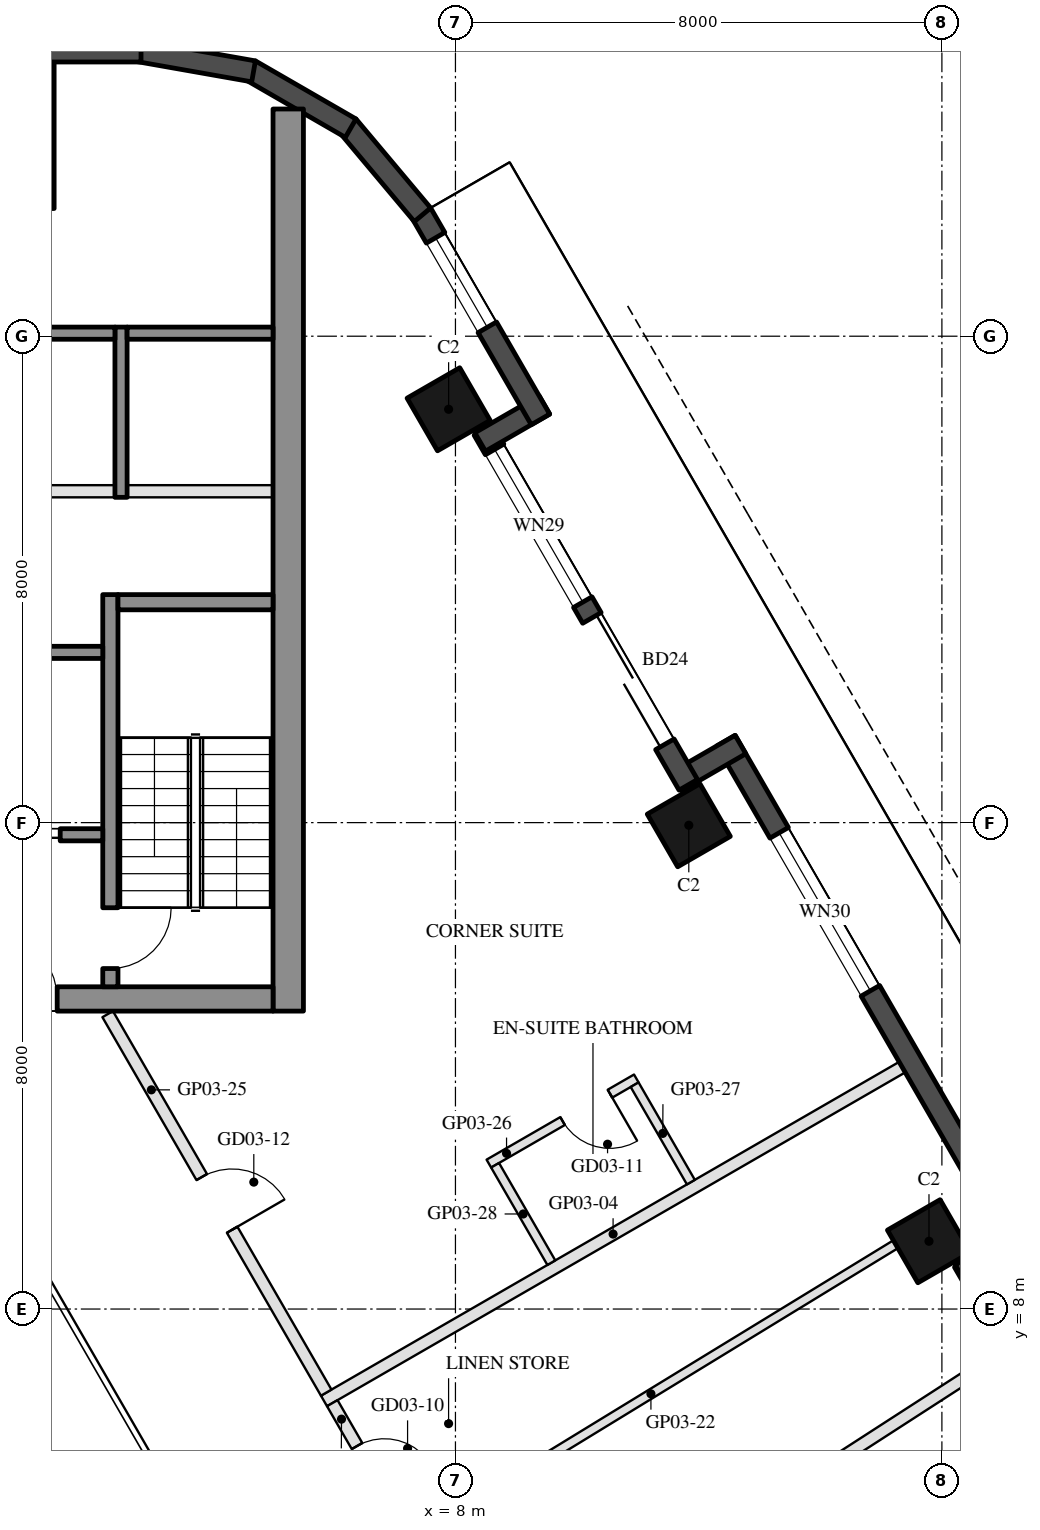
"""IFC4 building model, lengths in metres.
Left out: names, types, materials, properties, quantities, classifications, styles, units other than length and angle.
Written with IfcOpenShell. Run it as: python <this file> out.ifc"""

import sys

from ifc_helpers import new_model, si_unit, direction, frame, frame_2d, origin, origin_2d, place, context, subcontext, project, spatial, rectangle, hollow_rectangle, extrude, element, fill, save


model = new_model("IFC4")
c1 = context("Model", 3, precision=1e-05, world=origin(), true_north=direction((0.0, 1.0)))
c2 = subcontext(c1, "Body", "Model", "MODEL_VIEW")
j1 = project(units=[si_unit("LENGTHUNIT", "METRE"), si_unit("PLANEANGLEUNIT", "RADIAN")], contexts=[c1])
p1 = place(None, origin())
s1 = spatial("IfcSite", under=j1, at=p1, CompositionType="ELEMENT")
p2 = place(p1, origin())
s2 = spatial("IfcBuilding", under=s1, at=p2, CompositionType="ELEMENT")
p3 = place(p2, frame((0.0, 0.0, 61.3)))
s3 = spatial("IfcBuildingStorey", under=s2, at=p3, CompositionType="ELEMENT", Elevation=61.3)
for number, where, z_axis, x_axis in (
    (1, (15.788, 9.115, 0.0), (0.0, 0.0, 1.0), (-0.5, 0.866, 0.0)),
    (2, (11.838, 15.957, 0.0), (0.0, 0.0, 1.0), (-0.5, 0.866, 0.0)),
    (3, (7.888, 22.798, 0.0), (0.0, 0.0, 1.0), (-0.5, 0.866, 0.0)),
):
    element("IfcColumn", number, at=place(p3, frame(where, z_axis=z_axis, x_axis=x_axis)), inside=s3, PredefinedType="COLUMN", context=c2, shape_type="SweptSolid", body=[
        extrude(hollow_rectangle(XDim=1.0, YDim=1.0, WallThickness=0.045, at=origin_2d()), origin(), (0.0, 0.0, 1.0), 3.7),
    ])
p4 = place(p3, frame((0.0, 27.3, 0.0), z_axis=(0.0, 0.0, 1.0), x_axis=(1.0, 0.0, 0.0)))
e4 = element("IfcColumn", 4, at=p4, inside=s3, PredefinedType="COLUMN", context=c2, shape_type="SweptSolid", body=[
    extrude(hollow_rectangle(XDim=2.8, YDim=2.4, WallThickness=0.07, at=origin_2d()), origin(), (0.0, 0.0, 1.0), 3.7),
])
p5 = place(p3, frame((19.729, 2.938, 0.0), z_axis=(0.0, 0.0, 1.0), x_axis=(-0.499976430342, 0.866039011305, 0.0)))
e5 = element("IfcWall", 5, at=p5, inside=s3, PredefinedType="SOLIDWALL", context=c2, shape_type="SweptSolid", body=[
    extrude(rectangle(XDim=6.74, YDim=0.35, at=frame_2d((3.37, 0.0))), origin(), (0.0, 0.0, 1.0), 3.55),
])
p6 = place(p5, frame((0.77, 0.0, 0.3)))
e6 = element("IfcOpeningElement", 6, at=p6, cuts=e5, PredefinedType="OPENING", context=c2, shape_type="SweptSolid", body=[
    extrude(rectangle(XDim=1.7, YDim=2.65, at=frame_2d((0.85, 1.325))), frame((0.0, 0.185, 0.0), z_axis=(0.0, -1.0, 0.0), x_axis=(1.0, 0.0, 0.0)), (0.0, 0.0, 1.0), 0.37),
])
p7 = place(p5, frame((2.77, 0.0, 0.3)))
e7 = element("IfcOpeningElement", 7, at=p7, cuts=e5, PredefinedType="OPENING", context=c2, shape_type="SweptSolid", body=[
    extrude(rectangle(XDim=1.7, YDim=2.65, at=frame_2d((0.85, 1.325))), frame((0.0, 0.185, 0.0), z_axis=(0.0, -1.0, 0.0), x_axis=(1.0, 0.0, 0.0)), (0.0, 0.0, 1.0), 0.37),
])
p8 = place(p3, frame((16.306, 8.577, 0.0), z_axis=(0.0, 0.0, 1.0), x_axis=(0.866092288191, 0.499884134912, 0.0)))
e8 = element("IfcWall", 8, at=p8, inside=s3, PredefinedType="SOLIDWALL", context=c2, shape_type="SweptSolid", body=[
    extrude(rectangle(XDim=1.22, YDim=0.35, at=frame_2d((0.61, 0.0))), origin(), (0.0, 0.0, 1.0), 3.55),
])
p9 = place(p3, frame((17.299, 8.948, 0.0), z_axis=(0.0, 0.0, 1.0), x_axis=(-0.500010041276, 0.866019606374, 0.0)))
e9 = element("IfcWall", 9, at=p9, inside=s3, PredefinedType="SOLIDWALL", context=c2, shape_type="SweptSolid", body=[
    extrude(rectangle(XDim=9.7, YDim=0.35, at=frame_2d((4.85, 0.0))), origin(), (0.0, 0.0, 1.0), 3.55),
])
p10 = place(p9, frame((4.949, 0.0, 0.3)))
e10 = element("IfcOpeningElement", 10, at=p10, cuts=e9, PredefinedType="OPENING", context=c2, shape_type="SweptSolid", body=[
    extrude(rectangle(XDim=3.0, YDim=2.65, at=frame_2d((1.5, 1.325))), frame((0.0, 0.185, 0.0), z_axis=(0.0, -1.0, 0.0), x_axis=(1.0, 0.0, 0.0)), (0.0, 0.0, 1.0), 0.37),
])
p11 = place(p3, frame((12.688, 17.284, 0.0), z_axis=(0.0, 0.0, 1.0), x_axis=(-0.865955602162, -0.500120880472, 0.0)))
e11 = element("IfcWall", 11, at=p11, inside=s3, PredefinedType="SOLIDWALL", context=c2, shape_type="SweptSolid", body=[
    extrude(rectangle(XDim=1.22, YDim=0.35, at=frame_2d((0.61, 0.0))), origin(), (0.0, 0.0, 1.0), 3.55),
])
p12 = place(p3, frame((11.829, 16.621, 0.0), z_axis=(0.0, 0.0, 1.0), x_axis=(-0.500003597184, 0.866023326939, 0.0)))
e12 = element("IfcWall", 12, at=p12, inside=s3, PredefinedType="SOLIDWALL", context=c2, shape_type="SweptSolid", body=[
    extrude(rectangle(XDim=6.74, YDim=0.35, at=frame_2d((3.37, 0.0))), origin(), (0.0, 0.0, 1.0), 3.55),
])
p13 = place(p12, frame((0.77, 0.0, 0.0)))
e13 = element("IfcOpeningElement", 13, at=p13, cuts=e12, PredefinedType="OPENING", context=c2, shape_type="SweptSolid", body=[
    extrude(rectangle(XDim=2.4, YDim=2.4, at=frame_2d((1.2, 1.2))), frame((0.0, 0.185, 0.0), z_axis=(0.0, -1.0, 0.0), x_axis=(1.0, 0.0, 0.0)), (0.0, 0.0, 1.0), 0.37),
])
p14 = place(p12, frame((3.47, 0.0, 0.3)))
e14 = element("IfcOpeningElement", 14, at=p14, cuts=e12, PredefinedType="OPENING", context=c2, shape_type="SweptSolid", body=[
    extrude(rectangle(XDim=2.9, YDim=2.65, at=frame_2d((1.45, 1.325))), frame((0.0, 0.185, 0.0), z_axis=(0.0, -1.0, 0.0), x_axis=(1.0, 0.0, 0.0)), (0.0, 0.0, 1.0), 0.37),
])
p15 = place(p3, frame((8.406, 22.26, 0.0), z_axis=(0.0, 0.0, 1.0), x_axis=(0.865955602162, 0.500120880472, 0.0)))
e15 = element("IfcWall", 15, at=p15, inside=s3, PredefinedType="SOLIDWALL", context=c2, shape_type="SweptSolid", body=[
    extrude(rectangle(XDim=1.22, YDim=0.35, at=frame_2d((0.61, 0.0))), origin(), (0.0, 0.0, 1.0), 3.55),
])
p16 = place(p3, frame((9.398, 22.631, 0.0), z_axis=(0.0, 0.0, 1.0), x_axis=(-0.499954521343, 0.866051659307, 0.0)))
e16 = element("IfcWall", 16, at=p16, inside=s3, PredefinedType="SOLIDWALL", context=c2, shape_type="SweptSolid", body=[
    extrude(rectangle(XDim=3.916, YDim=0.35, at=frame_2d((1.958, 0.0))), origin(), (0.0, 0.0, 1.0), 3.55),
])
p17 = place(p16, frame((1.75, 0.0, 0.3)))
e17 = element("IfcOpeningElement", 17, at=p17, cuts=e16, PredefinedType="OPENING", context=c2, shape_type="SweptSolid", body=[
    extrude(rectangle(XDim=1.7, YDim=2.65, at=frame_2d((0.85, 1.325))), frame((0.0, 0.185, 0.0), z_axis=(0.0, -1.0, 0.0), x_axis=(1.0, 0.0, 0.0)), (0.0, 0.0, 1.0), 0.37),
])
p18 = place(p3, frame((7.458, 25.998, 0.0), z_axis=(0.0, 0.0, 1.0), x_axis=(-0.642808304945, 0.766027077259, 0.0)))
e18 = element("IfcWall", 18, at=p18, inside=s3, PredefinedType="SOLIDWALL", context=c2, shape_type="SweptSolid", body=[
    extrude(rectangle(XDim=1.91, YDim=0.35, at=frame_2d((0.955, 0.0))), origin(), (0.0, 0.0, 1.0), 3.55),
])
for number, where, z_axis, x_axis in (
    (19, (6.277, 27.422, 0.0), (0.0, 0.0, 1.0), (-0.866, 0.5, 0.0)),
    (20, (4.68, 28.356, 0.0), (0.0, 0.0, 1.0), (-0.985, 0.174, 0.0)),
):
    element("IfcWall", number, at=place(p3, frame(where, z_axis=z_axis, x_axis=x_axis)), inside=s3, PredefinedType="SOLIDWALL", context=c2, shape_type="SweptSolid", body=[
        extrude(rectangle(XDim=1.91, YDim=0.35, at=frame_2d((0.955, 0.0))), origin(), (0.0, 0.0, 1.0), 3.55),
    ])
p19 = place(p3, frame((2.829, 28.685, 0.0), z_axis=(0.0, 0.0, 1.0), x_axis=(-1.0, 0.0, 0.0)))
e21 = element("IfcWall", 21, at=p19, inside=s3, PredefinedType="SOLIDWALL", context=c2, shape_type="SweptSolid", body=[
    extrude(rectangle(XDim=5.658, YDim=0.35, at=frame_2d((2.829, 0.0))), origin(), (0.0, 0.0, 1.0), 3.55),
])
p20 = place(p3, frame((5.25, 12.9, 0.0), z_axis=(0.0, 0.0, 1.0), x_axis=(0.0, 1.0, 0.0)))
e22 = element("IfcWall", 22, at=p20, inside=s3, PredefinedType="SHEAR", context=c2, shape_type="SweptSolid", body=[
    extrude(rectangle(XDim=14.837, YDim=0.5, at=frame_2d((7.418, 0.0))), origin(), (0.0, 0.0, 1.0), 3.5),
])
p21 = place(p3, frame((5.0, 13.1, 0.0), z_axis=(0.0, 0.0, 1.0), x_axis=(-1.0, 0.0, 0.0)))
e23 = element("IfcWall", 23, at=p21, inside=s3, PredefinedType="SHEAR", context=c2, shape_type="SweptSolid", body=[
    extrude(rectangle(XDim=10.0, YDim=0.4, at=frame_2d((5.0, 0.0))), origin(), (0.0, 0.0, 1.0), 3.5),
])
p22 = place(p21, frame((3.55, 0.0, 0.0)))
e24 = element("IfcOpeningElement", 24, at=p22, cuts=e23, PredefinedType="OPENING", context=c2, shape_type="SweptSolid", body=[
    extrude(rectangle(XDim=1.1, YDim=2.1, at=frame_2d((0.55, 1.05))), frame((0.0, 0.21, 0.0), z_axis=(0.0, -1.0, 0.0), x_axis=(1.0, 0.0, 0.0)), (0.0, 0.0, 1.0), 0.42),
])
p23 = place(p21, frame((5.85, 0.0, 0.0)))
e25 = element("IfcOpeningElement", 25, at=p23, cuts=e23, PredefinedType="OPENING", context=c2, shape_type="SweptSolid", body=[
    extrude(rectangle(XDim=1.4, YDim=2.1, at=frame_2d((0.7, 1.05))), frame((0.0, 0.21, 0.0), z_axis=(0.0, -1.0, 0.0), x_axis=(1.0, 0.0, 0.0)), (0.0, 0.0, 1.0), 0.42),
])
p24 = place(p3, frame((2.325, 13.3, 0.0), z_axis=(0.0, 0.0, 1.0), x_axis=(0.0, 1.0, 0.0)))
e26 = element("IfcWall", 26, at=p24, inside=s3, PredefinedType="SHEAR", context=c2, shape_type="SweptSolid", body=[
    extrude(rectangle(XDim=6.45, YDim=0.25, at=frame_2d((3.225, 0.0))), origin(), (0.0, 0.0, 1.0), 3.5),
])
p25 = place(p24, frame((0.3, 0.0, 0.0)))
e27 = element("IfcOpeningElement", 27, at=p25, cuts=e26, PredefinedType="OPENING", context=c2, shape_type="SweptSolid", body=[
    extrude(rectangle(XDim=1.0, YDim=2.1, at=frame_2d((0.5, 1.05))), frame((0.0, 0.135, 0.0), z_axis=(0.0, -1.0, 0.0), x_axis=(1.0, 0.0, 0.0)), (0.0, 0.0, 1.0), 0.27),
])
p26 = place(p3, frame((5.0, 19.625, 0.0), z_axis=(0.0, 0.0, 1.0), x_axis=(-1.0, 0.0, 0.0)))
e28 = element("IfcWall", 28, at=p26, inside=s3, PredefinedType="SHEAR", context=c2, shape_type="SweptSolid", body=[
    extrude(rectangle(XDim=2.55, YDim=0.25, at=frame_2d((1.275, 0.0))), origin(), (0.0, 0.0, 1.0), 3.5),
])
p27 = place(p3, frame((2.2, 18.8, 0.0), z_axis=(0.0, 0.0, 1.0), x_axis=(-1.0, 0.0, 0.0)))
e29 = element("IfcWall", 29, at=p27, inside=s3, PredefinedType="SHEAR", context=c2, shape_type="SweptSolid", body=[
    extrude(rectangle(XDim=2.8, YDim=0.2, at=frame_2d((1.4, 0.0))), origin(), (0.0, 0.0, 1.0), 3.5),
])
p28 = place(p3, frame((2.2, 15.8, 0.0), z_axis=(0.0, 0.0, 1.0), x_axis=(-1.0, 0.0, 0.0)))
e30 = element("IfcWall", 30, at=p28, inside=s3, PredefinedType="SHEAR", context=c2, shape_type="SweptSolid", body=[
    extrude(rectangle(XDim=2.8, YDim=0.2, at=frame_2d((1.4, 0.0))), origin(), (0.0, 0.0, 1.0), 3.5),
])
p29 = place(p28, frame((0.7, 0.0, 0.0)))
e31 = element("IfcOpeningElement", 31, at=p29, cuts=e30, PredefinedType="OPENING", context=c2, shape_type="SweptSolid", body=[
    extrude(rectangle(XDim=1.2, YDim=2.1, at=frame_2d((0.6, 1.05))), frame((0.0, 0.11, 0.0), z_axis=(0.0, -1.0, 0.0), x_axis=(1.0, 0.0, 0.0)), (0.0, 0.0, 1.0), 0.22),
])
p30 = place(p3, frame((2.5, 21.35, 0.0), z_axis=(0.0, 0.0, 1.0), x_axis=(0.0, 1.0, 0.0)))
e32 = element("IfcWall", 32, at=p30, inside=s3, PredefinedType="SHEAR", context=c2, shape_type="SweptSolid", body=[
    extrude(rectangle(XDim=2.8, YDim=0.2, at=frame_2d((1.4, 0.0))), origin(), (0.0, 0.0, 1.0), 3.5),
])
p31 = place(p3, frame((5.0, 24.05, 0.0), z_axis=(0.0, 0.0, 1.0), x_axis=(-1.0, 0.0, 0.0)))
e33 = element("IfcWall", 33, at=p31, inside=s3, PredefinedType="SHEAR", context=c2, shape_type="SweptSolid", body=[
    extrude(rectangle(XDim=2.4, YDim=0.2, at=frame_2d((1.2, 0.0))), origin(), (0.0, 0.0, 1.0), 3.5),
])
p32 = place(p3, frame((2.4, 24.05, 0.0), z_axis=(0.0, 0.0, 1.0), x_axis=(-1.0, 0.0, 0.0)))
e34 = element("IfcWall", 34, at=p32, inside=s3, PredefinedType="SHEAR", context=c2, shape_type="SweptSolid", body=[
    extrude(rectangle(XDim=2.8, YDim=0.2, at=frame_2d((1.4, 0.0))), origin(), (0.0, 0.0, 1.0), 3.5),
])
p33 = place(p3, frame((5.0, 21.45, 0.0), z_axis=(0.0, 0.0, 1.0), x_axis=(-1.0, 0.0, 0.0)))
e35 = element("IfcWall", 35, at=p33, inside=s3, PredefinedType="PARTITIONING", context=c2, shape_type="SweptSolid", body=[
    extrude(rectangle(XDim=2.4, YDim=0.2, at=frame_2d((1.2, 0.0))), origin(), (0.0, 0.0, 1.0), 3.5),
])
p34 = place(p3, frame((2.4, 21.45, 0.0), z_axis=(0.0, 0.0, 1.0), x_axis=(-1.0, 0.0, 0.0)))
e36 = element("IfcWall", 36, at=p34, inside=s3, PredefinedType="PARTITIONING", context=c2, shape_type="SweptSolid", body=[
    extrude(rectangle(XDim=2.8, YDim=0.2, at=frame_2d((1.4, 0.0))), origin(), (0.0, 0.0, 1.0), 3.5),
])
p35 = place(p3, frame((17.02, 7.28, 0.0), z_axis=(0.0, 0.0, 1.0), x_axis=(-0.839924980805, -0.542702521294, 0.0)))
e37 = element("IfcWall", 37, at=p35, inside=s3, PredefinedType="PARTITIONING", context=c2, shape_type="SweptSolid", body=[
    extrude(rectangle(XDim=10.093, YDim=0.2, at=frame_2d((5.046, 0.0))), origin(), (0.0, 0.0, 1.0), 2.96),
])
p36 = place(p3, frame((15.347, 11.978, 0.0), z_axis=(0.0, 0.0, 1.0), x_axis=(-0.866027479907, -0.499996404033, 0.0)))
e38 = element("IfcWall", 38, at=p36, inside=s3, PredefinedType="PARTITIONING", context=c2, shape_type="SweptSolid", body=[
    extrude(rectangle(XDim=10.98, YDim=0.2, at=frame_2d((5.49, 0.0))), origin(), (0.0, 0.0, 1.0), 2.96),
])
p37 = place(p3, frame((15.239, 9.065, 0.0), z_axis=(0.0, 0.0, 1.0), x_axis=(-0.853241525467, -0.521515962573, 0.0)))
e39 = element("IfcWall", 39, at=p37, inside=s3, PredefinedType="PARTITIONING", context=c2, shape_type="SweptSolid", body=[
    extrude(rectangle(XDim=9.433, YDim=0.15, at=frame_2d((4.716, 0.0))), origin(), (0.0, 0.0, 1.0), 2.95),
])
p38 = place(p3, frame((5.975, 6.452, 0.0), z_axis=(0.0, 0.0, 1.0), x_axis=(0.499962146402, -0.866047257466, 0.0)))
e40 = element("IfcWall", 40, at=p38, inside=s3, PredefinedType="PARTITIONING", context=c2, shape_type="SweptSolid", body=[
    extrude(rectangle(XDim=2.528, YDim=0.2, at=frame_2d((1.264, 0.0))), origin(), (0.0, 0.0, 1.0), 2.95),
])
p39 = place(p38, frame((0.814, 0.0, 0.0)))
e41 = element("IfcOpeningElement", 41, at=p39, cuts=e40, PredefinedType="OPENING", context=c2, shape_type="SweptSolid", body=[
    extrude(rectangle(XDim=0.9, YDim=2.1, at=frame_2d((0.45, 1.05))), frame((0.0, 0.11, 0.0), z_axis=(0.0, -1.0, 0.0), x_axis=(1.0, 0.0, 0.0)), (0.0, 0.0, 1.0), 0.22),
])
p40 = place(p3, frame((2.281, 12.85, 0.0), z_axis=(0.0, 0.0, 1.0), x_axis=(0.499992939664, -0.866029480033, 0.0)))
e42 = element("IfcWall", 42, at=p40, inside=s3, PredefinedType="PARTITIONING", context=c2, shape_type="SweptSolid", body=[
    extrude(rectangle(XDim=7.188, YDim=0.2, at=frame_2d((3.594, 0.0))), origin(), (0.0, 0.0, 1.0), 2.95),
])
p41 = place(p40, frame((3.094, 0.0, 0.0)))
e43 = element("IfcOpeningElement", 43, at=p41, cuts=e42, PredefinedType="OPENING", context=c2, shape_type="SweptSolid", body=[
    extrude(rectangle(XDim=1.0, YDim=2.1, at=frame_2d((0.5, 1.05))), frame((0.0, 0.11, 0.0), z_axis=(0.0, -1.0, 0.0), x_axis=(1.0, 0.0, 0.0)), (0.0, 0.0, 1.0), 0.22),
])
p42 = place(p3, frame((10.974, 11.792, 0.0), z_axis=(0.0, 0.0, 1.0), x_axis=(-0.866056369097, -0.49994636267, 0.0)))
e44 = element("IfcWall", 44, at=p42, inside=s3, PredefinedType="PARTITIONING", context=c2, shape_type="SweptSolid", body=[
    extrude(rectangle(XDim=2.8, YDim=0.15, at=frame_2d((1.4, 0.0))), origin(), (0.0, 0.0, 1.0), 3.55),
])
p43 = place(p42, frame((0.5, 0.0, 0.0)))
e45 = element("IfcOpeningElement", 45, at=p43, cuts=e44, PredefinedType="OPENING", context=c2, shape_type="SweptSolid", body=[
    extrude(rectangle(XDim=0.9, YDim=2.1, at=frame_2d((0.45, 1.05))), frame((0.0, 0.085, 0.0), z_axis=(0.0, -1.0, 0.0), x_axis=(1.0, 0.0, 0.0)), (0.0, 0.0, 1.0), 0.17),
])
for number, where, z_axis, x_axis in (
    (46, (11.872, 10.087, 0.0), (0.0, 0.0, 1.0), (-0.5, 0.866, 0.0)),
    (47, (9.577, 8.762, 0.0), (0.0, 0.0, 1.0), (-0.5, 0.866, 0.0)),
):
    element("IfcWall", number, at=place(p3, frame(where, z_axis=z_axis, x_axis=x_axis)), inside=s3, PredefinedType="PARTITIONING", context=c2, shape_type="SweptSolid", body=[
        extrude(rectangle(XDim=1.85, YDim=0.15, at=frame_2d((0.925, 0.0))), origin(), (0.0, 0.0, 1.0), 2.95),
    ])
p44 = place(p10, origin())
e48 = element("IfcWindow", 48, at=p44, inside=s3, PartitioningType="SINGLE_PANEL", PredefinedType="WINDOW", context=c2, shape_type="SweptSolid", body=[
    extrude(rectangle(XDim=3.0, YDim=2.65, at=frame_2d((1.5, 1.325))), frame((0.0, 0.03, 0.0), z_axis=(0.0, -1.0, 0.0), x_axis=(1.0, 0.0, 0.0)), (0.0, 0.0, 1.0), 0.06),
])
fill(e10, e48)
p45 = place(p13, frame((2.4, 0.0, 0.0), z_axis=(0.0, 0.0, 1.0), x_axis=(-1.0, 0.0, 0.0)))
e49 = element("IfcDoor", 49, at=p45, inside=s3, OperationType="SLIDING_TO_LEFT", PredefinedType="DOOR", context=c2, shape_type="SweptSolid", body=[
    extrude(rectangle(XDim=2.4, YDim=2.4, at=frame_2d((1.2, 1.2))), frame((0.0, 0.025, 0.0), z_axis=(0.0, -1.0, 0.0), x_axis=(1.0, 0.0, 0.0)), (0.0, 0.0, 1.0), 0.05),
])
fill(e13, e49)
p46 = place(p14, origin())
e50 = element("IfcWindow", 50, at=p46, inside=s3, PartitioningType="SINGLE_PANEL", PredefinedType="WINDOW", context=c2, shape_type="SweptSolid", body=[
    extrude(rectangle(XDim=2.9, YDim=2.65, at=frame_2d((1.45, 1.325))), frame((0.0, 0.03, 0.0), z_axis=(0.0, -1.0, 0.0), x_axis=(1.0, 0.0, 0.0)), (0.0, 0.0, 1.0), 0.06),
])
fill(e14, e50)
p47 = place(p17, origin())
e51 = element("IfcWindow", 51, at=p47, inside=s3, PartitioningType="SINGLE_PANEL", PredefinedType="WINDOW", context=c2, shape_type="SweptSolid", body=[
    extrude(rectangle(XDim=1.7, YDim=2.65, at=frame_2d((0.85, 1.325))), frame((0.0, 0.03, 0.0), z_axis=(0.0, -1.0, 0.0), x_axis=(1.0, 0.0, 0.0)), (0.0, 0.0, 1.0), 0.06),
])
fill(e17, e51)
p48 = place(p29, origin())
e52 = element("IfcDoor", 52, at=p48, inside=s3, OperationType="DOUBLE_DOOR_SLIDING", PredefinedType="DOOR", context=c2, shape_type="SweptSolid", body=[
    extrude(rectangle(XDim=1.2, YDim=2.1, at=frame_2d((0.6, 1.05))), frame((0.0, 0.025, 0.0), z_axis=(0.0, -1.0, 0.0), x_axis=(1.0, 0.0, 0.0)), (0.0, 0.0, 1.0), 0.05),
])
fill(e31, e52)
p49 = place(p22, frame((1.1, 0.0, 0.0), z_axis=(0.0, 0.0, 1.0), x_axis=(-1.0, 0.0, 0.0)))
e53 = element("IfcDoor", 53, at=p49, inside=s3, OperationType="SINGLE_SWING_LEFT", PredefinedType="DOOR", context=c2, shape_type="SweptSolid", body=[
    extrude(rectangle(XDim=1.1, YDim=2.1, at=frame_2d((0.55, 1.05))), frame((0.0, 0.025, 0.0), z_axis=(0.0, -1.0, 0.0), x_axis=(1.0, 0.0, 0.0)), (0.0, 0.0, 1.0), 0.05),
])
fill(e24, e53)
p50 = place(p25, frame((1.0, 0.0, 0.0), z_axis=(0.0, 0.0, 1.0), x_axis=(-1.0, 0.0, 0.0)))
e54 = element("IfcDoor", 54, at=p50, inside=s3, OperationType="SINGLE_SWING_LEFT", PredefinedType="DOOR", context=c2, shape_type="SweptSolid", body=[
    extrude(rectangle(XDim=1.0, YDim=2.1, at=frame_2d((0.5, 1.05))), frame((0.0, 0.025, 0.0), z_axis=(0.0, -1.0, 0.0), x_axis=(1.0, 0.0, 0.0)), (0.0, 0.0, 1.0), 0.05),
])
fill(e27, e54)
p51 = place(p39, origin())
e55 = element("IfcDoor", 55, at=p51, inside=s3, OperationType="SINGLE_SWING_RIGHT", PredefinedType="DOOR", context=c2, shape_type="SweptSolid", body=[
    extrude(rectangle(XDim=0.9, YDim=2.1, at=frame_2d((0.45, 1.05))), frame((0.0, 0.025, 0.0), z_axis=(0.0, -1.0, 0.0), x_axis=(1.0, 0.0, 0.0)), (0.0, 0.0, 1.0), 0.05),
])
fill(e41, e55)
p52 = place(p43, origin())
e56 = element("IfcDoor", 56, at=p52, inside=s3, OperationType="SINGLE_SWING_LEFT", PredefinedType="DOOR", context=c2, shape_type="SweptSolid", body=[
    extrude(rectangle(XDim=0.9, YDim=2.1, at=frame_2d((0.45, 1.05))), frame((0.0, 0.025, 0.0), z_axis=(0.0, -1.0, 0.0), x_axis=(1.0, 0.0, 0.0)), (0.0, 0.0, 1.0), 0.05),
])
fill(e45, e56)
p53 = place(p41, origin())
e57 = element("IfcDoor", 57, at=p53, inside=s3, OperationType="SINGLE_SWING_RIGHT", PredefinedType="DOOR", context=c2, shape_type="SweptSolid", body=[
    extrude(rectangle(XDim=1.0, YDim=2.1, at=frame_2d((0.5, 1.05))), frame((0.0, 0.025, 0.0), z_axis=(0.0, -1.0, 0.0), x_axis=(1.0, 0.0, 0.0)), (0.0, 0.0, 1.0), 0.05),
])
fill(e43, e57)
save(model, sys.argv[1])
